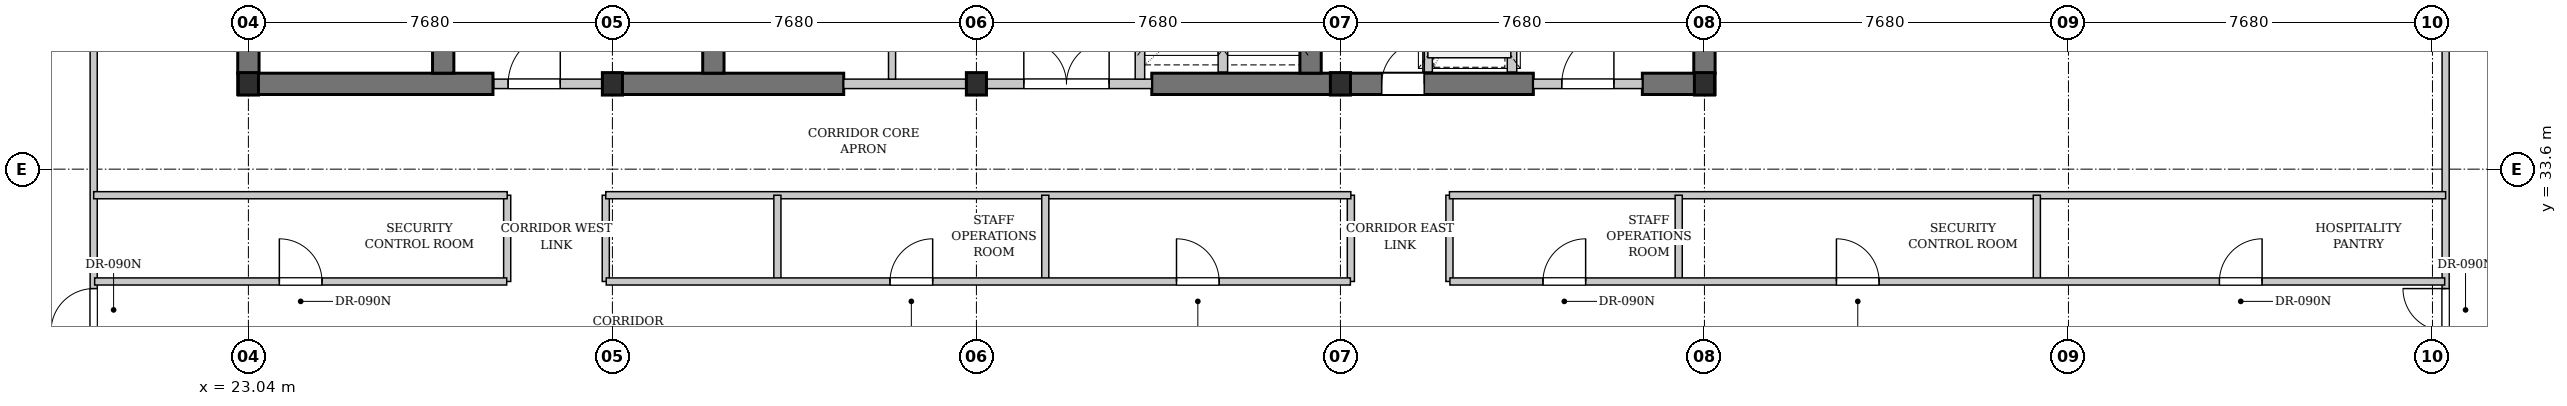
"""IFC4 building model, lengths in metres.
Left out: names, types, materials, properties, quantities, classifications, styles, units other than length and angle.
Written with IfcOpenShell. Run it as: python <this file> out.ifc"""

import sys

from ifc_helpers import new_model, si_unit, direction, frame, frame_2d, origin, origin_2d, place, context, subcontext, project, spatial, rectangle, i_section, extrude, element, fill, save


model = new_model("IFC4")
c1 = context("Model", 3, precision=1e-05, world=origin(), true_north=direction((0.0, 1.0)))
c2 = subcontext(c1, "Body", "Model", "MODEL_VIEW")
j1 = project(units=[si_unit("LENGTHUNIT", "METRE"), si_unit("PLANEANGLEUNIT", "RADIAN")], contexts=[c1])
p1 = place(None, origin())
s1 = spatial("IfcSite", under=j1, at=p1, CompositionType="ELEMENT")
p2 = place(p1, origin())
s2 = spatial("IfcBuilding", under=s1, at=p2, CompositionType="ELEMENT")
p3 = place(p2, frame((0.0, 0.0, 113.5)))
s3 = spatial("IfcBuildingStorey", under=s2, at=p3, CompositionType="ELEMENT", Elevation=113.5)
p4 = place(p3, frame((22.815, 35.4, 0.0), z_axis=(0.0, 0.0, 1.0), x_axis=(1.0, 0.0, 0.0)))
e1 = element("IfcWall", 1, at=p4, inside=s3, PredefinedType="SHEAR", context=c2, shape_type="SweptSolid", body=[
    extrude(rectangle(XDim=5.385, YDim=0.45, at=frame_2d((2.692, 0.0))), origin(), (0.0, 0.0, 1.0), 3.18),
])
p5 = place(p3, frame((30.72, 35.4, 0.0), z_axis=(0.0, 0.0, 1.0), x_axis=(1.0, 0.0, 0.0)))
e2 = element("IfcWall", 2, at=p5, inside=s3, PredefinedType="SHEAR", context=c2, shape_type="SweptSolid", body=[
    extrude(rectangle(XDim=4.88, YDim=0.45, at=frame_2d((2.44, 0.0))), origin(), (0.0, 0.0, 1.0), 3.18),
])
p6 = place(p3, frame((42.1, 35.4, 0.0), z_axis=(0.0, 0.0, 1.0), x_axis=(1.0, 0.0, 0.0)))
e3 = element("IfcWall", 3, at=p6, inside=s3, PredefinedType="SHEAR", context=c2, shape_type="SweptSolid", body=[
    extrude(rectangle(XDim=8.05, YDim=0.45, at=frame_2d((4.025, 0.0))), origin(), (0.0, 0.0, 1.0), 3.18),
])
p7 = place(p6, frame((4.85, 0.0, 0.0)))
e4 = element("IfcOpeningElement", 4, at=p7, cuts=e3, PredefinedType="OPENING", context=c2, shape_type="SweptSolid", body=[
    extrude(rectangle(XDim=0.9, YDim=2.15, at=frame_2d((0.45, 1.075))), frame((0.0, 0.235, 0.0), z_axis=(0.0, -1.0, 0.0), x_axis=(1.0, 0.0, 0.0)), (0.0, 0.0, 1.0), 0.47),
])
p8 = place(p3, frame((52.45, 35.4, 0.0), z_axis=(0.0, 0.0, 1.0), x_axis=(1.0, 0.0, 0.0)))
e5 = element("IfcWall", 5, at=p8, inside=s3, PredefinedType="SHEAR", context=c2, shape_type="SweptSolid", body=[
    extrude(rectangle(XDim=1.535, YDim=0.45, at=frame_2d((0.768, 0.0))), origin(), (0.0, 0.0, 1.0), 3.18),
])
p9 = place(p3, frame((23.04, 35.625, 0.0), z_axis=(0.0, 0.0, 1.0), x_axis=(0.0, 1.0, 0.0)))
e6 = element("IfcWall", 6, at=p9, inside=s3, PredefinedType="SHEAR", context=c2, shape_type="SweptSolid", body=[
    extrude(rectangle(XDim=10.35, YDim=0.45, at=frame_2d((5.175, 0.0))), origin(), (0.0, 0.0, 1.0), 3.18),
])
p10 = place(p3, frame((27.15, 35.625, 0.0), z_axis=(0.0, 0.0, 1.0), x_axis=(0.0, 1.0, 0.0)))
e7 = element("IfcWall", 7, at=p10, inside=s3, PredefinedType="SHEAR", context=c2, shape_type="SweptSolid", body=[
    extrude(rectangle(XDim=10.35, YDim=0.45, at=frame_2d((5.175, 0.0))), origin(), (0.0, 0.0, 1.0), 3.18),
])
p11 = place(p10, frame((0.675, 0.0, 0.0)))
e8 = element("IfcOpeningElement", 8, at=p11, cuts=e7, PredefinedType="OPENING", context=c2, shape_type="SweptSolid", body=[
    extrude(rectangle(XDim=1.1, YDim=2.15, at=frame_2d((0.55, 1.075))), frame((0.0, 0.235, 0.0), z_axis=(0.0, -1.0, 0.0), x_axis=(1.0, 0.0, 0.0)), (0.0, 0.0, 1.0), 0.47),
])
for number, where, z_axis, x_axis in (
    (9, (32.85, 35.625, 0.0), (0.0, 0.0, 1.0), (0.0, 1.0, 0.0)),
    (10, (45.45, 35.625, 0.0), (0.0, 0.0, 1.0), (0.0, 1.0, 0.0)),
    (11, (53.76, 35.625, 0.0), (0.0, 0.0, 1.0), (0.0, 1.0, 0.0)),
):
    element("IfcWall", number, at=place(p3, frame(where, z_axis=z_axis, x_axis=x_axis)), inside=s3, PredefinedType="SHEAR", context=c2, shape_type="SweptSolid", body=[
        extrude(rectangle(XDim=10.35, YDim=0.45, at=frame_2d((5.175, 0.0))), origin(), (0.0, 0.0, 1.0), 3.18),
    ])
for number, where, z_axis, x_axis in (
    (12, (23.04, 35.4, 0.0), (0.0, 0.0, 1.0), (1.0, 0.0, 0.0)),
    (13, (30.72, 35.4, 0.0), (0.0, 0.0, 1.0), (1.0, 0.0, 0.0)),
    (14, (38.4, 35.4, 0.0), (0.0, 0.0, 1.0), (1.0, 0.0, 0.0)),
    (15, (46.08, 35.4, 0.0), (0.0, 0.0, 1.0), (1.0, 0.0, 0.0)),
    (16, (53.76, 35.4, 0.0), (0.0, 0.0, 1.0), (1.0, 0.0, 0.0)),
):
    element("IfcColumn", number, at=place(p3, frame(where, z_axis=z_axis, x_axis=x_axis)), inside=s3, PredefinedType="COLUMN", context=c2, shape_type="SweptSolid", body=[
        extrude(i_section(OverallWidth=0.424, OverallDepth=0.474, WebThickness=0.047, FlangeThickness=0.077, FilletRadius=0.015, at=origin_2d()), origin(), (0.0, 0.0, 1.0), 3.4),
    ])
p12 = place(p3, frame((28.22, 35.4, 0.0), z_axis=(0.0, 0.0, 1.0), x_axis=(1.0, 0.0, 0.0)))
e17 = element("IfcWall", 17, at=p12, inside=s3, PredefinedType="PARTITIONING", context=c2, shape_type="SweptSolid", body=[
    extrude(rectangle(XDim=2.5, YDim=0.2, at=frame_2d((1.25, 0.0))), origin(), (0.0, 0.0, 1.0), 2.525),
])
p13 = place(p12, frame((0.3, 0.0, 0.0)))
e18 = element("IfcOpeningElement", 18, at=p13, cuts=e17, PredefinedType="OPENING", context=c2, shape_type="SweptSolid", body=[
    extrude(rectangle(XDim=1.1, YDim=2.15, at=frame_2d((0.55, 1.075))), frame((0.0, 0.11, 0.0), z_axis=(0.0, -1.0, 0.0), x_axis=(1.0, 0.0, 0.0)), (0.0, 0.0, 1.0), 0.22),
])
p14 = place(p3, frame((35.6, 35.4, 0.0), z_axis=(0.0, 0.0, 1.0), x_axis=(1.0, 0.0, 0.0)))
e19 = element("IfcWall", 19, at=p14, inside=s3, PredefinedType="PARTITIONING", context=c2, shape_type="SweptSolid", body=[
    extrude(rectangle(XDim=6.5, YDim=0.2, at=frame_2d((3.25, 0.0))), origin(), (0.0, 0.0, 1.0), 2.525),
])
p15 = place(p14, frame((3.8, 0.0, 0.0)))
e20 = element("IfcOpeningElement", 20, at=p15, cuts=e19, PredefinedType="OPENING", context=c2, shape_type="SweptSolid", body=[
    extrude(rectangle(XDim=1.8, YDim=2.3, at=frame_2d((0.9, 1.15))), frame((0.0, 0.11, 0.0), z_axis=(0.0, -1.0, 0.0), x_axis=(1.0, 0.0, 0.0)), (0.0, 0.0, 1.0), 0.22),
])
p16 = place(p3, frame((36.62, 35.5, 0.0), z_axis=(0.0, 0.0, 1.0), x_axis=(0.0, 1.0, 0.0)))
e21 = element("IfcWall", 21, at=p16, inside=s3, PredefinedType="PARTITIONING", context=c2, shape_type="SweptSolid", body=[
    extrude(rectangle(XDim=10.42, YDim=0.15, at=frame_2d((5.21, 0.0))), origin(), (0.0, 0.0, 1.0), 3.18),
])
p17 = place(p16, frame((3.92, 0.0, 0.0)))
e22 = element("IfcOpeningElement", 22, at=p17, cuts=e21, PredefinedType="OPENING", context=c2, shape_type="SweptSolid", body=[
    extrude(rectangle(XDim=0.9, YDim=2.15, at=frame_2d((0.45, 1.075))), frame((0.0, 0.085, 0.0), z_axis=(0.0, -1.0, 0.0), x_axis=(1.0, 0.0, 0.0)), (0.0, 0.0, 1.0), 0.17),
])
p18 = place(p16, frame((5.85, 0.0, 0.0)))
e23 = element("IfcOpeningElement", 23, at=p18, cuts=e21, PredefinedType="OPENING", context=c2, shape_type="SweptSolid", body=[
    extrude(rectangle(XDim=0.9, YDim=2.15, at=frame_2d((0.45, 1.075))), frame((0.0, 0.085, 0.0), z_axis=(0.0, -1.0, 0.0), x_axis=(1.0, 0.0, 0.0)), (0.0, 0.0, 1.0), 0.17),
])
p19 = place(p3, frame((43.6, 35.65, 0.0), z_axis=(0.0, 0.0, 1.0), x_axis=(0.0, 1.0, 0.0)))
e24 = element("IfcWall", 24, at=p19, inside=s3, PredefinedType="PARTITIONING", context=c2, shape_type="SweptSolid", body=[
    extrude(rectangle(XDim=3.25, YDim=0.2, at=frame_2d((1.625, 0.0))), origin(), (0.0, 0.0, 1.0), 3.18),
])
p20 = place(p3, frame((41.85, 35.5, 0.0), z_axis=(0.0, 0.0, 1.0), x_axis=(0.0, 1.0, 0.0)))
e25 = element("IfcWall", 25, at=p20, inside=s3, PredefinedType="PARTITIONING", context=c2, shape_type="SweptSolid", body=[
    extrude(rectangle(XDim=3.4, YDim=0.2, at=frame_2d((1.7, 0.0))), origin(), (0.0, 0.0, 1.0), 3.18),
])
p21 = place(p3, frame((50.15, 35.4, 0.0), z_axis=(0.0, 0.0, 1.0), x_axis=(1.0, 0.0, 0.0)))
e26 = element("IfcWall", 26, at=p21, inside=s3, PredefinedType="PARTITIONING", context=c2, shape_type="SweptSolid", body=[
    extrude(rectangle(XDim=2.3, YDim=0.2, at=frame_2d((1.15, 0.0))), origin(), (0.0, 0.0, 1.0), 2.525),
])
p22 = place(p21, frame((0.6, 0.0, 0.0)))
e27 = element("IfcOpeningElement", 27, at=p22, cuts=e26, PredefinedType="OPENING", context=c2, shape_type="SweptSolid", body=[
    extrude(rectangle(XDim=1.1, YDim=2.15, at=frame_2d((0.55, 1.075))), frame((0.0, 0.11, 0.0), z_axis=(0.0, -1.0, 0.0), x_axis=(1.0, 0.0, 0.0)), (0.0, 0.0, 1.0), 0.22),
])
p23 = place(p3, frame((49.7, 35.65, 0.0), z_axis=(0.0, 0.0, 1.0), x_axis=(0.0, 1.0, 0.0)))
e28 = element("IfcWall", 28, at=p23, inside=s3, PredefinedType="PARTITIONING", context=c2, shape_type="SweptSolid", body=[
    extrude(rectangle(XDim=3.15, YDim=0.2, at=frame_2d((1.575, 0.0))), origin(), (0.0, 0.0, 1.0), 3.18),
])
p24 = place(p23, frame((0.85, 0.0, 0.0)))
e29 = element("IfcOpeningElement", 29, at=p24, cuts=e28, PredefinedType="OPENING", context=c2, shape_type="SweptSolid", body=[
    extrude(rectangle(XDim=1.2, YDim=2.2, at=frame_2d((0.6, 1.1))), frame((0.0, 0.11, 0.0), z_axis=(0.0, -1.0, 0.0), x_axis=(1.0, 0.0, 0.0)), (0.0, 0.0, 1.0), 0.22),
])
p25 = place(p3, frame((47.92, 35.65, 0.0), z_axis=(0.0, 0.0, 1.0), x_axis=(0.0, 1.0, 0.0)))
e30 = element("IfcWall", 30, at=p25, inside=s3, PredefinedType="PARTITIONING", context=c2, shape_type="SweptSolid", body=[
    extrude(rectangle(XDim=3.15, YDim=0.2, at=frame_2d((1.575, 0.0))), origin(), (0.0, 0.0, 1.0), 3.18),
])
p26 = place(p3, frame((19.776, 29.15, 0.0), z_axis=(0.0, 0.0, 1.0), x_axis=(0.0, 1.0, 0.0)))
e31 = element("IfcWall", 31, at=p26, inside=s3, PredefinedType="PARTITIONING", context=c2, shape_type="SweptSolid", body=[
    extrude(rectangle(XDim=17.034, YDim=0.15, at=frame_2d((8.517, 0.0))), origin(), (0.0, 0.0, 1.0), 3.18),
])
p27 = place(p26, frame((1.03, 0.0, 0.0)))
e32 = element("IfcOpeningElement", 32, at=p27, cuts=e31, PredefinedType="OPENING", context=c2, shape_type="SweptSolid", body=[
    extrude(rectangle(XDim=0.9, YDim=2.15, at=frame_2d((0.45, 1.075))), frame((0.0, 0.085, 0.0), z_axis=(0.0, -1.0, 0.0), x_axis=(1.0, 0.0, 0.0)), (0.0, 0.0, 1.0), 0.17),
])
p28 = place(p3, frame((69.398, 29.15, 0.0), z_axis=(0.0, 0.0, 1.0), x_axis=(0.0, 1.0, 0.0)))
e33 = element("IfcWall", 33, at=p28, inside=s3, PredefinedType="PARTITIONING", context=c2, shape_type="SweptSolid", body=[
    extrude(rectangle(XDim=21.812, YDim=0.15, at=frame_2d((10.906, 0.0))), origin(), (0.0, 0.0, 1.0), 3.18),
])
p29 = place(p28, frame((1.03, 0.0, 0.0)))
e34 = element("IfcOpeningElement", 34, at=p29, cuts=e33, PredefinedType="OPENING", context=c2, shape_type="SweptSolid", body=[
    extrude(rectangle(XDim=0.9, YDim=2.15, at=frame_2d((0.45, 1.075))), frame((0.0, 0.085, 0.0), z_axis=(0.0, -1.0, 0.0), x_axis=(1.0, 0.0, 0.0)), (0.0, 0.0, 1.0), 0.17),
])
p30 = place(p3, frame((28.5, 31.23, 0.0), z_axis=(0.0, 0.0, 1.0), x_axis=(0.0, 1.0, 0.0)))
e35 = element("IfcWall", 35, at=p30, inside=s3, PredefinedType="PARTITIONING", context=c2, shape_type="SweptSolid", body=[
    extrude(rectangle(XDim=1.82, YDim=0.15, at=frame_2d((0.91, 0.0))), origin(), (0.0, 0.0, 1.0), 3.18),
])
for number, where, z_axis, x_axis in (
    (36, (30.58, 31.23, 0.0), (0.0, 0.0, 1.0), (0.0, 1.0, 0.0)),
    (37, (46.3, 31.23, 0.0), (0.0, 0.0, 1.0), (0.0, 1.0, 0.0)),
):
    element("IfcWall", number, at=place(p3, frame(where, z_axis=z_axis, x_axis=x_axis)), inside=s3, PredefinedType="PARTITIONING", context=c2, shape_type="SweptSolid", body=[
        extrude(rectangle(XDim=1.82, YDim=0.15, at=frame_2d((0.91, 0.0))), origin(), (0.0, 0.0, 1.0), 2.525),
    ])
p31 = place(p3, frame((48.38, 31.23, 0.0), z_axis=(0.0, 0.0, 1.0), x_axis=(0.0, 1.0, 0.0)))
e38 = element("IfcWall", 38, at=p31, inside=s3, PredefinedType="PARTITIONING", context=c2, shape_type="SweptSolid", body=[
    extrude(rectangle(XDim=1.82, YDim=0.15, at=frame_2d((0.91, 0.0))), origin(), (0.0, 0.0, 1.0), 3.18),
])
p32 = place(p3, frame((19.776, 33.05, 0.0), z_axis=(0.0, 0.0, 1.0), x_axis=(1.0, 0.0, 0.0)))
e39 = element("IfcWall", 39, at=p32, inside=s3, PredefinedType="PARTITIONING", context=c2, shape_type="SweptSolid", body=[
    extrude(rectangle(XDim=8.724, YDim=0.15, at=frame_2d((4.362, 0.0))), origin(), (0.0, 0.0, 1.0), 3.18),
])
p33 = place(p3, frame((30.58, 33.05, 0.0), z_axis=(0.0, 0.0, 1.0), x_axis=(1.0, 0.0, 0.0)))
e40 = element("IfcWall", 40, at=p33, inside=s3, PredefinedType="PARTITIONING", context=c2, shape_type="SweptSolid", body=[
    extrude(rectangle(XDim=15.72, YDim=0.15, at=frame_2d((7.86, 0.0))), origin(), (0.0, 0.0, 1.0), 3.18),
])
p34 = place(p3, frame((48.38, 33.05, 0.0), z_axis=(0.0, 0.0, 1.0), x_axis=(1.0, 0.0, 0.0)))
e41 = element("IfcWall", 41, at=p34, inside=s3, PredefinedType="PARTITIONING", context=c2, shape_type="SweptSolid", body=[
    extrude(rectangle(XDim=21.018, YDim=0.15, at=frame_2d((10.509, 0.0))), origin(), (0.0, 0.0, 1.0), 2.525),
])
p35 = place(p3, frame((19.796, 31.23, 0.0), z_axis=(0.0, 0.0, 1.0), x_axis=(1.0, 0.0, 0.0)))
e42 = element("IfcWall", 42, at=p35, inside=s3, PredefinedType="PARTITIONING", context=c2, shape_type="SweptSolid", body=[
    extrude(rectangle(XDim=8.694, YDim=0.15, at=frame_2d((4.347, 0.0))), origin(), (0.0, 0.0, 1.0), 3.18),
])
p36 = place(p35, frame((3.897, 0.0, 0.0)))
e43 = element("IfcOpeningElement", 43, at=p36, cuts=e42, PredefinedType="OPENING", context=c2, shape_type="SweptSolid", body=[
    extrude(rectangle(XDim=0.9, YDim=2.15, at=frame_2d((0.45, 1.075))), frame((0.0, 0.085, 0.0), z_axis=(0.0, -1.0, 0.0), x_axis=(1.0, 0.0, 0.0)), (0.0, 0.0, 1.0), 0.17),
])
for number, where, z_axis, x_axis in (
    (44, (34.201, 31.23, 0.0), (0.0, 0.0, 1.0), (0.0, 1.0, 0.0)),
    (45, (39.853, 31.23, 0.0), (0.0, 0.0, 1.0), (0.0, 1.0, 0.0)),
):
    element("IfcWall", number, at=place(p3, frame(where, z_axis=z_axis, x_axis=x_axis)), inside=s3, PredefinedType="PARTITIONING", context=c2, shape_type="SweptSolid", body=[
        extrude(rectangle(XDim=1.82, YDim=0.15, at=frame_2d((0.91, 0.0))), origin(), (0.0, 0.0, 1.0), 3.18),
    ])
p37 = place(p3, frame((30.59, 31.23, 0.0), z_axis=(0.0, 0.0, 1.0), x_axis=(1.0, 0.0, 0.0)))
e46 = element("IfcWall", 46, at=p37, inside=s3, PredefinedType="PARTITIONING", context=c2, shape_type="SweptSolid", body=[
    extrude(rectangle(XDim=15.7, YDim=0.15, at=frame_2d((7.85, 0.0))), origin(), (0.0, 0.0, 1.0), 3.18),
])
p38 = place(p37, frame((5.987, 0.0, 0.0)))
e47 = element("IfcOpeningElement", 47, at=p38, cuts=e46, PredefinedType="OPENING", context=c2, shape_type="SweptSolid", body=[
    extrude(rectangle(XDim=0.9, YDim=2.15, at=frame_2d((0.45, 1.075))), frame((0.0, 0.085, 0.0), z_axis=(0.0, -1.0, 0.0), x_axis=(1.0, 0.0, 0.0)), (0.0, 0.0, 1.0), 0.17),
])
p39 = place(p37, frame((12.031, 0.0, 0.0)))
e48 = element("IfcOpeningElement", 48, at=p39, cuts=e46, PredefinedType="OPENING", context=c2, shape_type="SweptSolid", body=[
    extrude(rectangle(XDim=0.9, YDim=2.15, at=frame_2d((0.45, 1.075))), frame((0.0, 0.085, 0.0), z_axis=(0.0, -1.0, 0.0), x_axis=(1.0, 0.0, 0.0)), (0.0, 0.0, 1.0), 0.17),
])
for number, where, z_axis, x_axis in (
    (49, (53.217, 31.23, 0.0), (0.0, 0.0, 1.0), (0.0, 1.0, 0.0)),
    (50, (60.773, 31.23, 0.0), (0.0, 0.0, 1.0), (0.0, 1.0, 0.0)),
):
    element("IfcWall", number, at=place(p3, frame(where, z_axis=z_axis, x_axis=x_axis)), inside=s3, PredefinedType="PARTITIONING", context=c2, shape_type="SweptSolid", body=[
        extrude(rectangle(XDim=1.82, YDim=0.15, at=frame_2d((0.91, 0.0))), origin(), (0.0, 0.0, 1.0), 3.18),
    ])
p40 = place(p3, frame((48.39, 31.23, 0.0), z_axis=(0.0, 0.0, 1.0), x_axis=(1.0, 0.0, 0.0)))
e51 = element("IfcWall", 51, at=p40, inside=s3, PredefinedType="PARTITIONING", context=c2, shape_type="SweptSolid", body=[
    extrude(rectangle(XDim=20.988, YDim=0.15, at=frame_2d((10.494, 0.0))), origin(), (0.0, 0.0, 1.0), 2.525),
])
p41 = place(p40, frame((1.963, 0.0, 0.0)))
e52 = element("IfcOpeningElement", 52, at=p41, cuts=e51, PredefinedType="OPENING", context=c2, shape_type="SweptSolid", body=[
    extrude(rectangle(XDim=0.9, YDim=2.15, at=frame_2d((0.45, 1.075))), frame((0.0, 0.085, 0.0), z_axis=(0.0, -1.0, 0.0), x_axis=(1.0, 0.0, 0.0)), (0.0, 0.0, 1.0), 0.17),
])
p42 = place(p40, frame((8.155, 0.0, 0.0)))
e53 = element("IfcOpeningElement", 53, at=p42, cuts=e51, PredefinedType="OPENING", context=c2, shape_type="SweptSolid", body=[
    extrude(rectangle(XDim=0.9, YDim=2.15, at=frame_2d((0.45, 1.075))), frame((0.0, 0.085, 0.0), z_axis=(0.0, -1.0, 0.0), x_axis=(1.0, 0.0, 0.0)), (0.0, 0.0, 1.0), 0.17),
])
p43 = place(p40, frame((16.236, 0.0, 0.0)))
e54 = element("IfcOpeningElement", 54, at=p43, cuts=e51, PredefinedType="OPENING", context=c2, shape_type="SweptSolid", body=[
    extrude(rectangle(XDim=0.9, YDim=2.15, at=frame_2d((0.45, 1.075))), frame((0.0, 0.085, 0.0), z_axis=(0.0, -1.0, 0.0), x_axis=(1.0, 0.0, 0.0)), (0.0, 0.0, 1.0), 0.17),
])
p44 = place(p13, origin())
e55 = element("IfcDoor", 55, at=p44, inside=s3, OperationType="SINGLE_SWING_RIGHT", PredefinedType="DOOR", context=c2, shape_type="SweptSolid", body=[
    extrude(rectangle(XDim=1.1, YDim=2.15, at=frame_2d((0.55, 1.075))), frame((0.0, 0.025, 0.0), z_axis=(0.0, -1.0, 0.0), x_axis=(1.0, 0.0, 0.0)), (0.0, 0.0, 1.0), 0.05),
])
fill(e18, e55)
p45 = place(p15, origin())
e56 = element("IfcDoor", 56, at=p45, inside=s3, OperationType="DOUBLE_DOOR_SINGLE_SWING", PredefinedType="DOOR", context=c2, shape_type="SweptSolid", body=[
    extrude(rectangle(XDim=1.8, YDim=2.3, at=frame_2d((0.9, 1.15))), frame((0.0, 0.025, 0.0), z_axis=(0.0, -1.0, 0.0), x_axis=(1.0, 0.0, 0.0)), (0.0, 0.0, 1.0), 0.05),
])
fill(e20, e56)
p46 = place(p22, origin())
e57 = element("IfcDoor", 57, at=p46, inside=s3, OperationType="SINGLE_SWING_RIGHT", PredefinedType="DOOR", context=c2, shape_type="SweptSolid", body=[
    extrude(rectangle(XDim=1.1, YDim=2.15, at=frame_2d((0.55, 1.075))), frame((0.0, 0.025, 0.0), z_axis=(0.0, -1.0, 0.0), x_axis=(1.0, 0.0, 0.0)), (0.0, 0.0, 1.0), 0.05),
])
fill(e27, e57)
p47 = place(p27, origin())
e58 = element("IfcDoor", 58, at=p47, inside=s3, OperationType="SINGLE_SWING_LEFT", PredefinedType="DOOR", context=c2, shape_type="SweptSolid", body=[
    extrude(rectangle(XDim=0.9, YDim=2.15, at=frame_2d((0.45, 1.075))), frame((0.0, 0.025, 0.0), z_axis=(0.0, -1.0, 0.0), x_axis=(1.0, 0.0, 0.0)), (0.0, 0.0, 1.0), 0.05),
])
fill(e32, e58)
p48 = place(p29, origin())
e59 = element("IfcDoor", 59, at=p48, inside=s3, OperationType="SINGLE_SWING_RIGHT", PredefinedType="DOOR", context=c2, shape_type="SweptSolid", body=[
    extrude(rectangle(XDim=0.9, YDim=2.15, at=frame_2d((0.45, 1.075))), frame((0.0, 0.025, 0.0), z_axis=(0.0, -1.0, 0.0), x_axis=(1.0, 0.0, 0.0)), (0.0, 0.0, 1.0), 0.05),
])
fill(e34, e59)
p49 = place(p36, origin())
e60 = element("IfcDoor", 60, at=p49, inside=s3, OperationType="SINGLE_SWING_LEFT", PredefinedType="DOOR", context=c2, shape_type="SweptSolid", body=[
    extrude(rectangle(XDim=0.9, YDim=2.15, at=frame_2d((0.45, 1.075))), frame((0.0, 0.025, 0.0), z_axis=(0.0, -1.0, 0.0), x_axis=(1.0, 0.0, 0.0)), (0.0, 0.0, 1.0), 0.05),
])
fill(e43, e60)
p50 = place(p38, origin())
e61 = element("IfcDoor", 61, at=p50, inside=s3, OperationType="SINGLE_SWING_RIGHT", PredefinedType="DOOR", context=c2, shape_type="SweptSolid", body=[
    extrude(rectangle(XDim=0.9, YDim=2.15, at=frame_2d((0.45, 1.075))), frame((0.0, 0.025, 0.0), z_axis=(0.0, -1.0, 0.0), x_axis=(1.0, 0.0, 0.0)), (0.0, 0.0, 1.0), 0.05),
])
fill(e47, e61)
p51 = place(p39, origin())
e62 = element("IfcDoor", 62, at=p51, inside=s3, OperationType="SINGLE_SWING_LEFT", PredefinedType="DOOR", context=c2, shape_type="SweptSolid", body=[
    extrude(rectangle(XDim=0.9, YDim=2.15, at=frame_2d((0.45, 1.075))), frame((0.0, 0.025, 0.0), z_axis=(0.0, -1.0, 0.0), x_axis=(1.0, 0.0, 0.0)), (0.0, 0.0, 1.0), 0.05),
])
fill(e48, e62)
p52 = place(p41, origin())
e63 = element("IfcDoor", 63, at=p52, inside=s3, OperationType="SINGLE_SWING_RIGHT", PredefinedType="DOOR", context=c2, shape_type="SweptSolid", body=[
    extrude(rectangle(XDim=0.9, YDim=2.15, at=frame_2d((0.45, 1.075))), frame((0.0, 0.025, 0.0), z_axis=(0.0, -1.0, 0.0), x_axis=(1.0, 0.0, 0.0)), (0.0, 0.0, 1.0), 0.05),
])
fill(e52, e63)
p53 = place(p42, origin())
e64 = element("IfcDoor", 64, at=p53, inside=s3, OperationType="SINGLE_SWING_LEFT", PredefinedType="DOOR", context=c2, shape_type="SweptSolid", body=[
    extrude(rectangle(XDim=0.9, YDim=2.15, at=frame_2d((0.45, 1.075))), frame((0.0, 0.025, 0.0), z_axis=(0.0, -1.0, 0.0), x_axis=(1.0, 0.0, 0.0)), (0.0, 0.0, 1.0), 0.05),
])
fill(e53, e64)
p54 = place(p43, origin())
e65 = element("IfcDoor", 65, at=p54, inside=s3, OperationType="SINGLE_SWING_RIGHT", PredefinedType="DOOR", context=c2, shape_type="SweptSolid", body=[
    extrude(rectangle(XDim=0.9, YDim=2.15, at=frame_2d((0.45, 1.075))), frame((0.0, 0.025, 0.0), z_axis=(0.0, -1.0, 0.0), x_axis=(1.0, 0.0, 0.0)), (0.0, 0.0, 1.0), 0.05),
])
fill(e54, e65)
p55 = place(p7, origin())
e66 = element("IfcDoor", 66, at=p55, inside=s3, OperationType="SINGLE_SWING_RIGHT", PredefinedType="DOOR", context=c2, shape_type="SweptSolid", body=[
    extrude(rectangle(XDim=0.9, YDim=2.15, at=frame_2d((0.45, 1.075))), frame((0.0, 0.025, 0.0), z_axis=(0.0, -1.0, 0.0), x_axis=(1.0, 0.0, 0.0)), (0.0, 0.0, 1.0), 0.05),
])
fill(e4, e66)
save(model, sys.argv[1])
